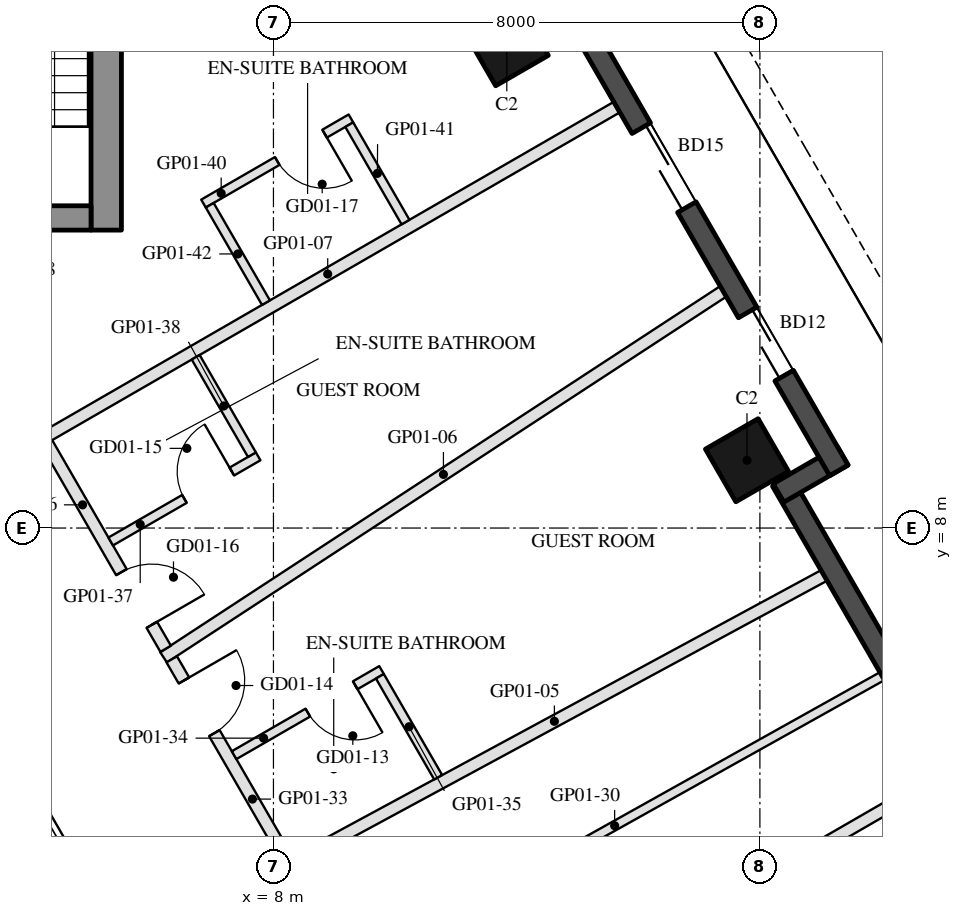
"""IFC4 building model, lengths in metres.
Left out: names, types, materials, properties, quantities, classifications, styles, units other than length and angle.
Written with IfcOpenShell. Run it as: python <this file> out.ifc"""

import sys

from ifc_helpers import new_model, si_unit, direction, frame, frame_2d, origin, origin_2d, place, context, subcontext, project, spatial, rectangle, hollow_rectangle, extrude, element, fill, save


model = new_model("IFC4")
c1 = context("Model", 3, precision=1e-05, world=origin(), true_north=direction((0.0, 1.0)))
c2 = subcontext(c1, "Body", "Model", "MODEL_VIEW")
j1 = project(units=[si_unit("LENGTHUNIT", "METRE"), si_unit("PLANEANGLEUNIT", "RADIAN")], contexts=[c1])
p1 = place(None, origin())
s1 = spatial("IfcSite", under=j1, at=p1, CompositionType="ELEMENT")
p2 = place(p1, origin())
s2 = spatial("IfcBuilding", under=s1, at=p2, CompositionType="ELEMENT")
p3 = place(p2, frame((0.0, 0.0, 46.5)))
s3 = spatial("IfcBuildingStorey", under=s2, at=p3, CompositionType="ELEMENT", Elevation=46.5)
for number, where, z_axis, x_axis in (
    (1, (15.788, 9.115, 0.0), (0.0, 0.0, 1.0), (-0.5, 0.866, 0.0)),
    (2, (11.838, 15.957, 0.0), (0.0, 0.0, 1.0), (-0.5, 0.866, 0.0)),
):
    element("IfcColumn", number, at=place(p3, frame(where, z_axis=z_axis, x_axis=x_axis)), inside=s3, PredefinedType="COLUMN", context=c2, shape_type="SweptSolid", body=[
        extrude(hollow_rectangle(XDim=1.0, YDim=1.0, WallThickness=0.045, at=origin_2d()), origin(), (0.0, 0.0, 1.0), 3.7),
    ])
p4 = place(p3, frame((19.729, 2.938, 0.0), z_axis=(0.0, 0.0, 1.0), x_axis=(-0.499976430342, 0.866039011305, 0.0)))
e3 = element("IfcWall", 3, at=p4, inside=s3, PredefinedType="SOLIDWALL", context=c2, shape_type="SweptSolid", body=[
    extrude(rectangle(XDim=6.74, YDim=0.35, at=frame_2d((3.37, 0.0))), origin(), (0.0, 0.0, 1.0), 3.55),
])
p5 = place(p3, frame((16.306, 8.577, 0.0), z_axis=(0.0, 0.0, 1.0), x_axis=(0.866092288191, 0.499884134912, 0.0)))
e4 = element("IfcWall", 4, at=p5, inside=s3, PredefinedType="SOLIDWALL", context=c2, shape_type="SweptSolid", body=[
    extrude(rectangle(XDim=1.22, YDim=0.35, at=frame_2d((0.61, 0.0))), origin(), (0.0, 0.0, 1.0), 3.55),
])
p6 = place(p3, frame((17.299, 8.948, 0.0), z_axis=(0.0, 0.0, 1.0), x_axis=(-0.500010041276, 0.866019606374, 0.0)))
e5 = element("IfcWall", 5, at=p6, inside=s3, PredefinedType="SOLIDWALL", context=c2, shape_type="SweptSolid", body=[
    extrude(rectangle(XDim=9.7, YDim=0.35, at=frame_2d((4.85, 0.0))), origin(), (0.0, 0.0, 1.0), 3.55),
])
p7 = place(p6, frame((1.8, 0.0, 0.0)))
e6 = element("IfcOpeningElement", 6, at=p7, cuts=e5, PredefinedType="OPENING", context=c2, shape_type="SweptSolid", body=[
    extrude(rectangle(XDim=1.2, YDim=2.4, at=frame_2d((0.6, 1.2))), frame((0.0, 0.185, 0.0), z_axis=(0.0, -1.0, 0.0), x_axis=(1.0, 0.0, 0.0)), (0.0, 0.0, 1.0), 0.37),
])
p8 = place(p6, frame((5.0, 0.0, 0.0)))
e7 = element("IfcOpeningElement", 7, at=p8, cuts=e5, PredefinedType="OPENING", context=c2, shape_type="SweptSolid", body=[
    extrude(rectangle(XDim=1.5, YDim=2.4, at=frame_2d((0.75, 1.2))), frame((0.0, 0.185, 0.0), z_axis=(0.0, -1.0, 0.0), x_axis=(1.0, 0.0, 0.0)), (0.0, 0.0, 1.0), 0.37),
])
p9 = place(p3, frame((5.25, 12.9, 0.0), z_axis=(0.0, 0.0, 1.0), x_axis=(0.0, 1.0, 0.0)))
e8 = element("IfcWall", 8, at=p9, inside=s3, PredefinedType="SHEAR", context=c2, shape_type="SweptSolid", body=[
    extrude(rectangle(XDim=14.837, YDim=0.5, at=frame_2d((7.418, 0.0))), origin(), (0.0, 0.0, 1.0), 3.5),
])
p10 = place(p3, frame((5.0, 13.1, 0.0), z_axis=(0.0, 0.0, 1.0), x_axis=(-1.0, 0.0, 0.0)))
e9 = element("IfcWall", 9, at=p10, inside=s3, PredefinedType="SHEAR", context=c2, shape_type="SweptSolid", body=[
    extrude(rectangle(XDim=10.0, YDim=0.4, at=frame_2d((5.0, 0.0))), origin(), (0.0, 0.0, 1.0), 3.5),
])
p11 = place(p10, frame((3.55, 0.0, 0.0)))
e10 = element("IfcOpeningElement", 10, at=p11, cuts=e9, PredefinedType="OPENING", context=c2, shape_type="SweptSolid", body=[
    extrude(rectangle(XDim=1.1, YDim=2.1, at=frame_2d((0.55, 1.05))), frame((0.0, 0.21, 0.0), z_axis=(0.0, -1.0, 0.0), x_axis=(1.0, 0.0, 0.0)), (0.0, 0.0, 1.0), 0.42),
])
p12 = place(p10, frame((5.85, 0.0, 0.0)))
e11 = element("IfcOpeningElement", 11, at=p12, cuts=e9, PredefinedType="OPENING", context=c2, shape_type="SweptSolid", body=[
    extrude(rectangle(XDim=1.4, YDim=2.1, at=frame_2d((0.7, 1.05))), frame((0.0, 0.21, 0.0), z_axis=(0.0, -1.0, 0.0), x_axis=(1.0, 0.0, 0.0)), (0.0, 0.0, 1.0), 0.42),
])
p13 = place(p3, frame((18.968, 3.907, 0.0), z_axis=(0.0, 0.0, 1.0), x_axis=(-0.866022637375, -0.500004791531, 0.0)))
e12 = element("IfcWall", 12, at=p13, inside=s3, PredefinedType="PARTITIONING", context=c2, shape_type="SweptSolid", body=[
    extrude(rectangle(XDim=10.08, YDim=0.2, at=frame_2d((5.04, 0.0))), origin(), (0.0, 0.0, 1.0), 2.96),
])
p14 = place(p3, frame((17.055, 7.22, 0.0), z_axis=(0.0, 0.0, 1.0), x_axis=(-0.87960357017, -0.475707430407, 0.0)))
e13 = element("IfcWall", 13, at=p14, inside=s3, PredefinedType="PARTITIONING", context=c2, shape_type="SweptSolid", body=[
    extrude(rectangle(XDim=10.084, YDim=0.2, at=frame_2d((5.042, 0.0))), origin(), (0.0, 0.0, 1.0), 2.96),
])
p15 = place(p3, frame((15.397, 11.892, 0.0), z_axis=(0.0, 0.0, 1.0), x_axis=(-0.836898817878, -0.547357624076, 0.0)))
e14 = element("IfcWall", 14, at=p15, inside=s3, PredefinedType="PARTITIONING", context=c2, shape_type="SweptSolid", body=[
    extrude(rectangle(XDim=10.997, YDim=0.2, at=frame_2d((5.499, 0.0))), origin(), (0.0, 0.0, 1.0), 2.96),
])
p16 = place(p3, frame((13.647, 14.923, 0.0), z_axis=(0.0, 0.0, 1.0), x_axis=(-0.866027479907, -0.499996404033, 0.0)))
e15 = element("IfcWall", 15, at=p16, inside=s3, PredefinedType="PARTITIONING", context=c2, shape_type="SweptSolid", body=[
    extrude(rectangle(XDim=10.98, YDim=0.2, at=frame_2d((5.49, 0.0))), origin(), (0.0, 0.0, 1.0), 2.96),
])
p17 = place(p3, frame((18.011, 5.563, 0.0), z_axis=(0.0, 0.0, 1.0), x_axis=(-0.872898889426, -0.487901146585, 0.0)))
e16 = element("IfcWall", 16, at=p17, inside=s3, PredefinedType="PARTITIONING", context=c2, shape_type="SweptSolid", body=[
    extrude(rectangle(XDim=10.081, YDim=0.15, at=frame_2d((5.041, 0.0))), origin(), (0.0, 0.0, 1.0), 2.95),
])
p18 = place(p3, frame((6.327, 5.841, 0.0), z_axis=(0.0, 0.0, 1.0), x_axis=(0.499982560684, -0.866035472144, 0.0)))
e17 = element("IfcWall", 17, at=p18, inside=s3, PredefinedType="PARTITIONING", context=c2, shape_type="SweptSolid", body=[
    extrude(rectangle(XDim=3.792, YDim=0.2, at=frame_2d((1.896, 0.0))), origin(), (0.0, 0.0, 1.0), 2.95),
])
p19 = place(p18, frame((0.401, 0.0, 0.0)))
e18 = element("IfcOpeningElement", 18, at=p19, cuts=e17, PredefinedType="OPENING", context=c2, shape_type="SweptSolid", body=[
    extrude(rectangle(XDim=1.0, YDim=2.1, at=frame_2d((0.5, 1.05))), frame((0.0, 0.11, 0.0), z_axis=(0.0, -1.0, 0.0), x_axis=(1.0, 0.0, 0.0)), (0.0, 0.0, 1.0), 0.22),
])
p20 = place(p3, frame((9.778, 5.664, 0.0), z_axis=(0.0, 0.0, 1.0), x_axis=(-0.866034573852, -0.49998411664, 0.0)))
e19 = element("IfcWall", 19, at=p20, inside=s3, PredefinedType="PARTITIONING", context=c2, shape_type="SweptSolid", body=[
    extrude(rectangle(XDim=2.8, YDim=0.15, at=frame_2d((1.4, 0.0))), origin(), (0.0, 0.0, 1.0), 2.95),
])
p21 = place(p20, frame((0.5, 0.0, 0.0)))
e20 = element("IfcOpeningElement", 20, at=p21, cuts=e19, PredefinedType="OPENING", context=c2, shape_type="SweptSolid", body=[
    extrude(rectangle(XDim=0.9, YDim=2.1, at=frame_2d((0.45, 1.05))), frame((0.0, 0.085, 0.0), z_axis=(0.0, -1.0, 0.0), x_axis=(1.0, 0.0, 0.0)), (0.0, 0.0, 1.0), 0.17),
])
p22 = place(p3, frame((10.709, 3.901, 0.0), z_axis=(0.0, 0.0, 1.0), x_axis=(-0.499946593449, 0.866056235875, 0.0)))
e21 = element("IfcWall", 21, at=p22, inside=s3, PredefinedType="PARTITIONING", context=c2, shape_type="SweptSolid", body=[
    extrude(rectangle(XDim=1.917, YDim=0.15, at=frame_2d((0.958, 0.0))), origin(), (0.0, 0.0, 1.0), 2.95),
])
p23 = place(p3, frame((4.275, 9.396, 0.0), z_axis=(0.0, 0.0, 1.0), x_axis=(0.499971370958, -0.866041932139, 0.0)))
e22 = element("IfcWall", 22, at=p23, inside=s3, PredefinedType="PARTITIONING", context=c2, shape_type="SweptSolid", body=[
    extrude(rectangle(XDim=3.906, YDim=0.2, at=frame_2d((1.953, 0.0))), origin(), (0.0, 0.0, 1.0), 2.95),
])
p24 = place(p23, frame((2.45, 0.0, 0.0)))
e23 = element("IfcOpeningElement", 23, at=p24, cuts=e22, PredefinedType="OPENING", context=c2, shape_type="SweptSolid", body=[
    extrude(rectangle(XDim=1.0, YDim=2.1, at=frame_2d((0.5, 1.05))), frame((0.0, 0.11, 0.0), z_axis=(0.0, -1.0, 0.0), x_axis=(1.0, 0.0, 0.0)), (0.0, 0.0, 1.0), 0.22),
])
p25 = place(p3, frame((5.324, 7.779, 0.0), z_axis=(0.0, 0.0, 1.0), x_axis=(0.865996816683, 0.500049511043, 0.0)))
e24 = element("IfcWall", 24, at=p25, inside=s3, PredefinedType="PARTITIONING", context=c2, shape_type="SweptSolid", body=[
    extrude(rectangle(XDim=2.8, YDim=0.15, at=frame_2d((1.4, 0.0))), origin(), (0.0, 0.0, 1.0), 2.95),
])
p26 = place(p25, frame((1.4, 0.0, 0.0)))
e25 = element("IfcOpeningElement", 25, at=p26, cuts=e24, PredefinedType="OPENING", context=c2, shape_type="SweptSolid", body=[
    extrude(rectangle(XDim=0.9, YDim=2.1, at=frame_2d((0.45, 1.05))), frame((0.0, 0.085, 0.0), z_axis=(0.0, -1.0, 0.0), x_axis=(1.0, 0.0, 0.0)), (0.0, 0.0, 1.0), 0.17),
])
p27 = place(p3, frame((7.646, 9.207, 0.0), z_axis=(0.0, 0.0, 1.0), x_axis=(-0.49994333299, 0.866058118026, 0.0)))
e26 = element("IfcWall", 26, at=p27, inside=s3, PredefinedType="PARTITIONING", context=c2, shape_type="SweptSolid", body=[
    extrude(rectangle(XDim=1.85, YDim=0.15, at=frame_2d((0.925, 0.0))), origin(), (0.0, 0.0, 1.0), 3.55),
])
p28 = place(p3, frame((9.274, 14.737, 0.0), z_axis=(0.0, 0.0, 1.0), x_axis=(-0.866018616679, -0.500011755427, 0.0)))
e27 = element("IfcWall", 27, at=p28, inside=s3, PredefinedType="PARTITIONING", context=c2, shape_type="SweptSolid", body=[
    extrude(rectangle(XDim=2.8, YDim=0.15, at=frame_2d((1.4, 0.0))), origin(), (0.0, 0.0, 1.0), 3.55),
])
p29 = place(p28, frame((0.5, 0.0, 0.0)))
e28 = element("IfcOpeningElement", 28, at=p29, cuts=e27, PredefinedType="OPENING", context=c2, shape_type="SweptSolid", body=[
    extrude(rectangle(XDim=0.9, YDim=2.1, at=frame_2d((0.45, 1.05))), frame((0.0, 0.085, 0.0), z_axis=(0.0, -1.0, 0.0), x_axis=(1.0, 0.0, 0.0)), (0.0, 0.0, 1.0), 0.17),
])
p30 = place(p3, frame((10.172, 13.032, 0.0), z_axis=(0.0, 0.0, 1.0), x_axis=(-0.500042316284, 0.866000971088, 0.0)))
e29 = element("IfcWall", 29, at=p30, inside=s3, PredefinedType="PARTITIONING", context=c2, shape_type="SweptSolid", body=[
    extrude(rectangle(XDim=1.85, YDim=0.15, at=frame_2d((0.925, 0.0))), origin(), (0.0, 0.0, 1.0), 2.95),
])
p31 = place(p3, frame((7.877, 11.707, 0.0), z_axis=(0.0, 0.0, 1.0), x_axis=(-0.499985172903, 0.866033964044, 0.0)))
e30 = element("IfcWall", 30, at=p31, inside=s3, PredefinedType="PARTITIONING", context=c2, shape_type="SweptSolid", body=[
    extrude(rectangle(XDim=1.85, YDim=0.15, at=frame_2d((0.925, 0.0))), origin(), (0.0, 0.0, 1.0), 2.95),
])
p32 = place(p7, frame((1.2, 0.0, 0.0), z_axis=(0.0, 0.0, 1.0), x_axis=(-1.0, 0.0, 0.0)))
e31 = element("IfcDoor", 31, at=p32, inside=s3, OperationType="SLIDING_TO_LEFT", PredefinedType="DOOR", context=c2, shape_type="SweptSolid", body=[
    extrude(rectangle(XDim=1.2, YDim=2.4, at=frame_2d((0.6, 1.2))), frame((0.0, 0.025, 0.0), z_axis=(0.0, -1.0, 0.0), x_axis=(1.0, 0.0, 0.0)), (0.0, 0.0, 1.0), 0.05),
])
fill(e6, e31)
p33 = place(p8, frame((1.5, 0.0, 0.0), z_axis=(0.0, 0.0, 1.0), x_axis=(-1.0, 0.0, 0.0)))
e32 = element("IfcDoor", 32, at=p33, inside=s3, OperationType="SLIDING_TO_LEFT", PredefinedType="DOOR", context=c2, shape_type="SweptSolid", body=[
    extrude(rectangle(XDim=1.5, YDim=2.4, at=frame_2d((0.75, 1.2))), frame((0.0, 0.025, 0.0), z_axis=(0.0, -1.0, 0.0), x_axis=(1.0, 0.0, 0.0)), (0.0, 0.0, 1.0), 0.05),
])
fill(e7, e32)
p34 = place(p21, origin())
e33 = element("IfcDoor", 33, at=p34, inside=s3, OperationType="SINGLE_SWING_LEFT", PredefinedType="DOOR", context=c2, shape_type="SweptSolid", body=[
    extrude(rectangle(XDim=0.9, YDim=2.1, at=frame_2d((0.45, 1.05))), frame((0.0, 0.025, 0.0), z_axis=(0.0, -1.0, 0.0), x_axis=(1.0, 0.0, 0.0)), (0.0, 0.0, 1.0), 0.05),
])
fill(e20, e33)
p35 = place(p19, origin())
e34 = element("IfcDoor", 34, at=p35, inside=s3, OperationType="SINGLE_SWING_LEFT", PredefinedType="DOOR", context=c2, shape_type="SweptSolid", body=[
    extrude(rectangle(XDim=1.0, YDim=2.1, at=frame_2d((0.5, 1.05))), frame((0.0, 0.025, 0.0), z_axis=(0.0, -1.0, 0.0), x_axis=(1.0, 0.0, 0.0)), (0.0, 0.0, 1.0), 0.05),
])
fill(e18, e34)
p36 = place(p26, origin())
e35 = element("IfcDoor", 35, at=p36, inside=s3, OperationType="SINGLE_SWING_RIGHT", PredefinedType="DOOR", context=c2, shape_type="SweptSolid", body=[
    extrude(rectangle(XDim=0.9, YDim=2.1, at=frame_2d((0.45, 1.05))), frame((0.0, 0.025, 0.0), z_axis=(0.0, -1.0, 0.0), x_axis=(1.0, 0.0, 0.0)), (0.0, 0.0, 1.0), 0.05),
])
fill(e25, e35)
p37 = place(p24, origin())
e36 = element("IfcDoor", 36, at=p37, inside=s3, OperationType="SINGLE_SWING_RIGHT", PredefinedType="DOOR", context=c2, shape_type="SweptSolid", body=[
    extrude(rectangle(XDim=1.0, YDim=2.1, at=frame_2d((0.5, 1.05))), frame((0.0, 0.025, 0.0), z_axis=(0.0, -1.0, 0.0), x_axis=(1.0, 0.0, 0.0)), (0.0, 0.0, 1.0), 0.05),
])
fill(e23, e36)
p38 = place(p29, origin())
e37 = element("IfcDoor", 37, at=p38, inside=s3, OperationType="SINGLE_SWING_LEFT", PredefinedType="DOOR", context=c2, shape_type="SweptSolid", body=[
    extrude(rectangle(XDim=0.9, YDim=2.1, at=frame_2d((0.45, 1.05))), frame((0.0, 0.025, 0.0), z_axis=(0.0, -1.0, 0.0), x_axis=(1.0, 0.0, 0.0)), (0.0, 0.0, 1.0), 0.05),
])
fill(e28, e37)
save(model, sys.argv[1])
